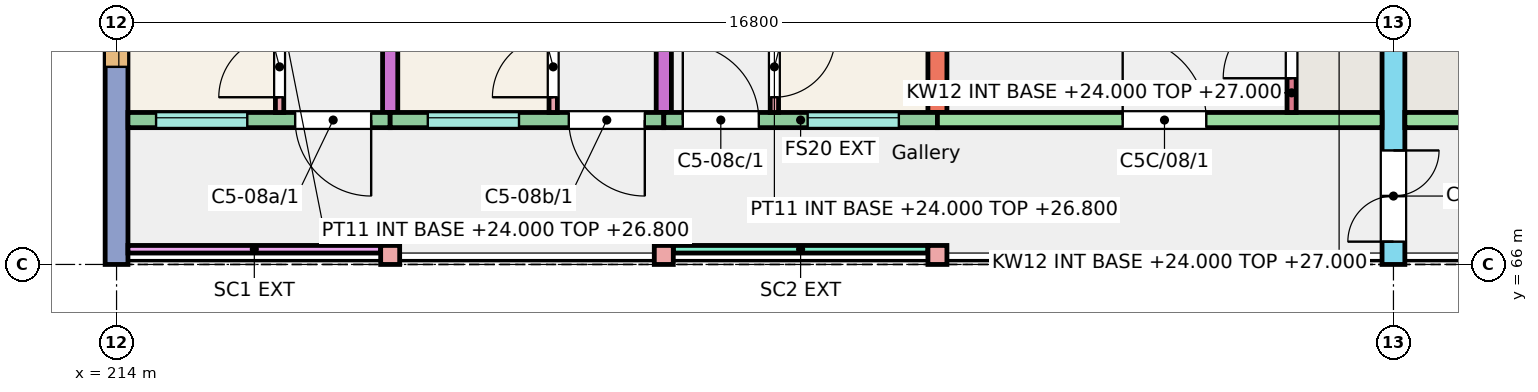
"""IFC4 building model, lengths in metres.
Left out: names, types, materials, properties, quantities, classifications, styles, units other than length and angle.
Written with IfcOpenShell. Run it as: python <this file> out.ifc"""

import sys

from ifc_helpers import new_model, si_unit, direction, frame, frame_2d, origin, origin_2d, place, context, subcontext, project, spatial, rectangle, extrude, element, fill, save


model = new_model("IFC4")
c1 = context("Model", 3, precision=1e-05, world=origin(), true_north=direction((0.0, 1.0)))
c2 = subcontext(c1, "Body", "Model", "MODEL_VIEW")
j1 = project(units=[si_unit("LENGTHUNIT", "METRE"), si_unit("PLANEANGLEUNIT", "RADIAN")], contexts=[c1])
p1 = place(None, origin())
s1 = spatial("IfcSite", under=j1, at=p1, CompositionType="ELEMENT")
p2 = place(p1, origin())
s2 = spatial("IfcBuilding", under=s1, at=p2, CompositionType="ELEMENT")
p3 = place(p2, frame((0.0, 0.0, 24.0)))
s3 = spatial("IfcBuildingStorey", under=s2, at=p3, CompositionType="ELEMENT", Elevation=24.0)
p4 = place(p3, frame((214.0, 66.0, 0.0), z_axis=(0.0, 0.0, 1.0), x_axis=(0.0, 1.0, 0.0)))
e1 = element("IfcWall", 1, at=p4, inside=s3, PredefinedType="SHEAR", context=c2, shape_type="SweptSolid", body=[
    extrude(rectangle(XDim=11.0, YDim=0.3, at=frame_2d((5.5, 0.0))), origin(), (0.0, 0.0, 1.0), 3.0),
])
p5 = place(p4, frame((2.6, 0.0, 0.9)))
e2 = element("IfcOpeningElement", 2, at=p5, cuts=e1, PredefinedType="OPENING", context=c2, shape_type="SweptSolid", body=[
    extrude(rectangle(XDim=1.2, YDim=1.5, at=frame_2d((0.6, 0.75))), frame((0.0, 0.16, 0.0), z_axis=(0.0, -1.0, 0.0), x_axis=(1.0, 0.0, 0.0)), (0.0, 0.0, 1.0), 0.32),
])
p6 = place(p4, frame((8.005, 0.0, 0.9)))
e3 = element("IfcOpeningElement", 3, at=p6, cuts=e1, PredefinedType="OPENING", context=c2, shape_type="SweptSolid", body=[
    extrude(rectangle(XDim=1.8, YDim=1.5, at=frame_2d((0.9, 0.75))), frame((0.0, 0.16, 0.0), z_axis=(0.0, -1.0, 0.0), x_axis=(1.0, 0.0, 0.0)), (0.0, 0.0, 1.0), 0.32),
])
for number, where, z_axis, x_axis in (
    (4, (217.6, 68.0, 0.0), (0.0, 0.0, 1.0), (0.0, 1.0, 0.0)),
    (5, (221.2, 68.0, 0.0), (0.0, 0.0, 1.0), (0.0, 1.0, 0.0)),
):
    element("IfcWall", number, at=place(p3, frame(where, z_axis=z_axis, x_axis=x_axis)), inside=s3, PredefinedType="SHEAR", context=c2, shape_type="SweptSolid", body=[
        extrude(rectangle(XDim=9.0, YDim=0.2, at=frame_2d((4.5, 0.0))), origin(), (0.0, 0.0, 1.0), 3.0),
    ])
p7 = place(p3, frame((224.8, 68.0, 0.0), z_axis=(0.0, 0.0, 1.0), x_axis=(0.0, 1.0, 0.0)))
e6 = element("IfcWall", 6, at=p7, inside=s3, PredefinedType="SHEAR", context=c2, shape_type="SweptSolid", body=[
    extrude(rectangle(XDim=9.0, YDim=0.25, at=frame_2d((4.5, 0.0))), origin(), (0.0, 0.0, 1.0), 3.0),
])
p8 = place(p3, frame((230.8, 66.0, 0.0), z_axis=(0.0, 0.0, 1.0), x_axis=(0.0, 1.0, 0.0)))
e7 = element("IfcWall", 7, at=p8, inside=s3, PredefinedType="SHEAR", context=c2, shape_type="SweptSolid", body=[
    extrude(rectangle(XDim=11.0, YDim=0.3, at=frame_2d((5.5, 0.0))), origin(), (0.0, 0.0, 1.0), 3.0),
])
p9 = place(p8, frame((0.3, 0.0, 0.0)))
e8 = element("IfcOpeningElement", 8, at=p9, cuts=e7, PredefinedType="OPENING", context=c2, shape_type="SweptSolid", body=[
    extrude(rectangle(XDim=1.2, YDim=2.1, at=frame_2d((0.6, 1.05))), frame((0.0, 0.16, 0.0), z_axis=(0.0, -1.0, 0.0), x_axis=(1.0, 0.0, 0.0)), (0.0, 0.0, 1.0), 0.32),
])
p10 = place(p3, frame((214.15, 67.9, 0.0), z_axis=(0.0, 0.0, 1.0), x_axis=(1.0, 0.0, 0.0)))
e9 = element("IfcWall", 9, at=p10, inside=s3, PredefinedType="SOLIDWALL", context=c2, shape_type="SweptSolid", body=[
    extrude(rectangle(XDim=3.45, YDim=0.2, at=frame_2d((1.725, 0.0))), origin(), (0.0, 0.0, 1.0), 3.0),
])
p11 = place(p10, frame((0.37, 0.0, 1.1)))
e10 = element("IfcOpeningElement", 10, at=p11, cuts=e9, PredefinedType="OPENING", context=c2, shape_type="SweptSolid", body=[
    extrude(rectangle(XDim=1.2, YDim=1.3, at=frame_2d((0.6, 0.65))), frame((0.0, 0.11, 0.0), z_axis=(0.0, -1.0, 0.0), x_axis=(1.0, 0.0, 0.0)), (0.0, 0.0, 1.0), 0.22),
])
p12 = place(p10, frame((2.2, 0.0, 0.0)))
e11 = element("IfcOpeningElement", 11, at=p12, cuts=e9, PredefinedType="OPENING", context=c2, shape_type="SweptSolid", body=[
    extrude(rectangle(XDim=1.0, YDim=2.1, at=frame_2d((0.5, 1.05))), frame((0.0, 0.11, 0.0), z_axis=(0.0, -1.0, 0.0), x_axis=(1.0, 0.0, 0.0)), (0.0, 0.0, 1.0), 0.22),
])
p13 = place(p3, frame((217.6, 67.9, 0.0), z_axis=(0.0, 0.0, 1.0), x_axis=(1.0, 0.0, 0.0)))
e12 = element("IfcWall", 12, at=p13, inside=s3, PredefinedType="SOLIDWALL", context=c2, shape_type="SweptSolid", body=[
    extrude(rectangle(XDim=3.6, YDim=0.2, at=frame_2d((1.8, 0.0))), origin(), (0.0, 0.0, 1.0), 3.0),
])
p14 = place(p13, frame((0.495, 0.0, 1.1)))
e13 = element("IfcOpeningElement", 13, at=p14, cuts=e12, PredefinedType="OPENING", context=c2, shape_type="SweptSolid", body=[
    extrude(rectangle(XDim=1.2, YDim=1.3, at=frame_2d((0.6, 0.65))), frame((0.0, 0.11, 0.0), z_axis=(0.0, -1.0, 0.0), x_axis=(1.0, 0.0, 0.0)), (0.0, 0.0, 1.0), 0.22),
])
p15 = place(p13, frame((2.35, 0.0, 0.0)))
e14 = element("IfcOpeningElement", 14, at=p15, cuts=e12, PredefinedType="OPENING", context=c2, shape_type="SweptSolid", body=[
    extrude(rectangle(XDim=1.0, YDim=2.1, at=frame_2d((0.5, 1.05))), frame((0.0, 0.11, 0.0), z_axis=(0.0, -1.0, 0.0), x_axis=(1.0, 0.0, 0.0)), (0.0, 0.0, 1.0), 0.22),
])
p16 = place(p3, frame((221.2, 67.9, 0.0), z_axis=(0.0, 0.0, 1.0), x_axis=(1.0, 0.0, 0.0)))
e15 = element("IfcWall", 15, at=p16, inside=s3, PredefinedType="SOLIDWALL", context=c2, shape_type="SweptSolid", body=[
    extrude(rectangle(XDim=3.6, YDim=0.2, at=frame_2d((1.8, 0.0))), origin(), (0.0, 0.0, 1.0), 3.0),
])
p17 = place(p16, frame((1.893, 0.0, 1.1)))
e16 = element("IfcOpeningElement", 16, at=p17, cuts=e15, PredefinedType="OPENING", context=c2, shape_type="SweptSolid", body=[
    extrude(rectangle(XDim=1.2, YDim=1.3, at=frame_2d((0.6, 0.65))), frame((0.0, 0.11, 0.0), z_axis=(0.0, -1.0, 0.0), x_axis=(1.0, 0.0, 0.0)), (0.0, 0.0, 1.0), 0.22),
])
p18 = place(p16, frame((0.25, 0.0, 0.0)))
e17 = element("IfcOpeningElement", 17, at=p18, cuts=e15, PredefinedType="OPENING", context=c2, shape_type="SweptSolid", body=[
    extrude(rectangle(XDim=1.0, YDim=2.1, at=frame_2d((0.5, 1.05))), frame((0.0, 0.11, 0.0), z_axis=(0.0, -1.0, 0.0), x_axis=(1.0, 0.0, 0.0)), (0.0, 0.0, 1.0), 0.22),
])
p19 = place(p3, frame((224.8, 67.9, 0.0), z_axis=(0.0, 0.0, 1.0), x_axis=(1.0, 0.0, 0.0)))
e18 = element("IfcWall", 18, at=p19, inside=s3, PredefinedType="SHEAR", context=c2, shape_type="SweptSolid", body=[
    extrude(rectangle(XDim=5.85, YDim=0.2, at=frame_2d((2.925, 0.0))), origin(), (0.0, 0.0, 1.0), 3.0),
])
p20 = place(p19, frame((2.438, 0.0, 0.0)))
e19 = element("IfcOpeningElement", 19, at=p20, cuts=e18, PredefinedType="OPENING", context=c2, shape_type="SweptSolid", body=[
    extrude(rectangle(XDim=1.1, YDim=2.1, at=frame_2d((0.55, 1.05))), frame((0.0, 0.11, 0.0), z_axis=(0.0, -1.0, 0.0), x_axis=(1.0, 0.0, 0.0)), (0.0, 0.0, 1.0), 0.22),
])
p21 = place(p3, frame((229.46, 68.0, 0.0), z_axis=(0.0, 0.0, 1.0), x_axis=(0.0, 1.0, 0.0)))
e20 = element("IfcWall", 20, at=p21, inside=s3, PredefinedType="SHEAR", context=c2, shape_type="SweptSolid", body=[
    extrude(rectangle(XDim=1.72, YDim=0.12, at=frame_2d((0.86, 0.0))), origin(), (0.0, 0.0, 1.0), 3.0),
])
p22 = place(p21, frame((0.45, 0.0, 0.0)))
e21 = element("IfcOpeningElement", 21, at=p22, cuts=e20, PredefinedType="OPENING", context=c2, shape_type="SweptSolid", body=[
    extrude(rectangle(XDim=0.9, YDim=2.1, at=frame_2d((0.45, 1.05))), frame((0.0, 0.07, 0.0), z_axis=(0.0, -1.0, 0.0), x_axis=(1.0, 0.0, 0.0)), (0.0, 0.0, 1.0), 0.14),
])
p23 = place(p3, frame((230.95, 67.9, 0.0), z_axis=(0.0, 0.0, 1.0), x_axis=(1.0, 0.0, 0.0)))
e22 = element("IfcWall", 22, at=p23, inside=s3, PredefinedType="SHEAR", context=c2, shape_type="SweptSolid", body=[
    extrude(rectangle(XDim=5.85, YDim=0.2, at=frame_2d((2.925, 0.0))), origin(), (0.0, 0.0, 1.0), 3.0),
])
p24 = place(p23, frame((2.312, 0.0, 0.0)))
e23 = element("IfcOpeningElement", 23, at=p24, cuts=e22, PredefinedType="OPENING", context=c2, shape_type="SweptSolid", body=[
    extrude(rectangle(XDim=1.1, YDim=2.1, at=frame_2d((0.55, 1.05))), frame((0.0, 0.11, 0.0), z_axis=(0.0, -1.0, 0.0), x_axis=(1.0, 0.0, 0.0)), (0.0, 0.0, 1.0), 0.22),
])
for number, where, z_axis, x_axis in (
    (24, (217.6, 66.125, 0.0), (0.0, 0.0, 1.0), (1.0, 0.0, 0.0)),
    (25, (221.2, 66.125, 0.0), (0.0, 0.0, 1.0), (1.0, 0.0, 0.0)),
    (26, (224.8, 66.125, 0.0), (0.0, 0.0, 1.0), (1.0, 0.0, 0.0)),
):
    element("IfcColumn", number, at=place(p3, frame(where, z_axis=z_axis, x_axis=x_axis)), inside=s3, PredefinedType="COLUMN", context=c2, shape_type="SweptSolid", body=[
        extrude(rectangle(XDim=0.25, YDim=0.25, at=origin_2d()), origin(), (0.0, 0.0, 1.0), 3.0),
    ])
p25 = place(p3, frame((214.15, 66.2, 0.0), z_axis=(0.0, 0.0, 1.0), x_axis=(1.0, 0.0, 0.0)))
e27 = element("IfcWall", 27, at=p25, inside=s3, PredefinedType="SOLIDWALL", context=c2, shape_type="SweptSolid", body=[
    extrude(rectangle(XDim=3.325, YDim=0.1, at=frame_2d((1.663, 0.0))), origin(), (0.0, 0.0, 1.0), 2.45),
])
p26 = place(p3, frame((221.325, 66.2, 0.0), z_axis=(0.0, 0.0, 1.0), x_axis=(1.0, 0.0, 0.0)))
e28 = element("IfcWall", 28, at=p26, inside=s3, PredefinedType="SOLIDWALL", context=c2, shape_type="SweptSolid", body=[
    extrude(rectangle(XDim=3.35, YDim=0.1, at=frame_2d((1.675, 0.0))), origin(), (0.0, 0.0, 1.0), 2.45),
])
p27 = place(p3, frame((216.145, 68.0, 0.0), z_axis=(0.0, 0.0, 1.0), x_axis=(0.0, 1.0, 0.0)))
e29 = element("IfcWall", 29, at=p27, inside=s3, PredefinedType="PARTITIONING", context=c2, shape_type="SweptSolid", body=[
    extrude(rectangle(XDim=4.7, YDim=0.11, at=frame_2d((2.35, 0.0))), origin(), (0.0, 0.0, 1.0), 2.8),
])
p28 = place(p27, frame((0.2, 0.0, 0.0)))
e30 = element("IfcOpeningElement", 30, at=p28, cuts=e29, PredefinedType="OPENING", context=c2, shape_type="SweptSolid", body=[
    extrude(rectangle(XDim=0.8, YDim=2.1, at=frame_2d((0.4, 1.05))), frame((0.0, 0.065, 0.0), z_axis=(0.0, -1.0, 0.0), x_axis=(1.0, 0.0, 0.0)), (0.0, 0.0, 1.0), 0.13),
])
p29 = place(p27, frame((3.75, 0.0, 0.0)))
e31 = element("IfcOpeningElement", 31, at=p29, cuts=e29, PredefinedType="OPENING", context=c2, shape_type="SweptSolid", body=[
    extrude(rectangle(XDim=0.8, YDim=2.1, at=frame_2d((0.4, 1.05))), frame((0.0, 0.065, 0.0), z_axis=(0.0, -1.0, 0.0), x_axis=(1.0, 0.0, 0.0)), (0.0, 0.0, 1.0), 0.13),
])
p30 = place(p3, frame((219.745, 68.0, 0.0), z_axis=(0.0, 0.0, 1.0), x_axis=(0.0, 1.0, 0.0)))
e32 = element("IfcWall", 32, at=p30, inside=s3, PredefinedType="PARTITIONING", context=c2, shape_type="SweptSolid", body=[
    extrude(rectangle(XDim=4.3, YDim=0.11, at=frame_2d((2.15, 0.0))), origin(), (0.0, 0.0, 1.0), 2.8),
])
p31 = place(p30, frame((0.2, 0.0, 0.0)))
e33 = element("IfcOpeningElement", 33, at=p31, cuts=e32, PredefinedType="OPENING", context=c2, shape_type="SweptSolid", body=[
    extrude(rectangle(XDim=0.8, YDim=2.1, at=frame_2d((0.4, 1.05))), frame((0.0, 0.065, 0.0), z_axis=(0.0, -1.0, 0.0), x_axis=(1.0, 0.0, 0.0)), (0.0, 0.0, 1.0), 0.13),
])
p32 = place(p30, frame((3.35, 0.0, 0.0)))
e34 = element("IfcOpeningElement", 34, at=p32, cuts=e32, PredefinedType="OPENING", context=c2, shape_type="SweptSolid", body=[
    extrude(rectangle(XDim=0.8, YDim=2.1, at=frame_2d((0.4, 1.05))), frame((0.0, 0.065, 0.0), z_axis=(0.0, -1.0, 0.0), x_axis=(1.0, 0.0, 0.0)), (0.0, 0.0, 1.0), 0.13),
])
p33 = place(p3, frame((222.655, 68.0, 0.0), z_axis=(0.0, 0.0, 1.0), x_axis=(0.0, 1.0, 0.0)))
e35 = element("IfcWall", 35, at=p33, inside=s3, PredefinedType="PARTITIONING", context=c2, shape_type="SweptSolid", body=[
    extrude(rectangle(XDim=4.7, YDim=0.11, at=frame_2d((2.35, 0.0))), origin(), (0.0, 0.0, 1.0), 2.8),
])
p34 = place(p33, frame((0.2, 0.0, 0.0)))
e36 = element("IfcOpeningElement", 36, at=p34, cuts=e35, PredefinedType="OPENING", context=c2, shape_type="SweptSolid", body=[
    extrude(rectangle(XDim=0.8, YDim=2.1, at=frame_2d((0.4, 1.05))), frame((0.0, 0.065, 0.0), z_axis=(0.0, -1.0, 0.0), x_axis=(1.0, 0.0, 0.0)), (0.0, 0.0, 1.0), 0.13),
])
p35 = place(p33, frame((3.75, 0.0, 0.0)))
e37 = element("IfcOpeningElement", 37, at=p35, cuts=e35, PredefinedType="OPENING", context=c2, shape_type="SweptSolid", body=[
    extrude(rectangle(XDim=0.8, YDim=2.1, at=frame_2d((0.4, 1.05))), frame((0.0, 0.065, 0.0), z_axis=(0.0, -1.0, 0.0), x_axis=(1.0, 0.0, 0.0)), (0.0, 0.0, 1.0), 0.13),
])
p36 = place(p11, origin())
e38 = element("IfcWindow", 38, at=p36, inside=s3, PartitioningType="SINGLE_PANEL", PredefinedType="WINDOW", context=c2, shape_type="SweptSolid", body=[
    extrude(rectangle(XDim=1.2, YDim=1.3, at=frame_2d((0.6, 0.65))), frame((0.0, 0.06, 0.0), z_axis=(0.0, -1.0, 0.0), x_axis=(1.0, 0.0, 0.0)), (0.0, 0.0, 1.0), 0.06),
])
fill(e10, e38)
p37 = place(p5, origin())
e39 = element("IfcWindow", 39, at=p37, inside=s3, PartitioningType="SINGLE_PANEL", PredefinedType="WINDOW", context=c2, shape_type="SweptSolid", body=[
    extrude(rectangle(XDim=1.2, YDim=1.5, at=frame_2d((0.6, 0.75))), frame((0.0, 0.0, 0.0), z_axis=(0.0, -1.0, 0.0), x_axis=(1.0, 0.0, 0.0)), (0.0, 0.0, 1.0), 0.06),
])
fill(e2, e39)
p38 = place(p14, origin())
e40 = element("IfcWindow", 40, at=p38, inside=s3, PartitioningType="SINGLE_PANEL", PredefinedType="WINDOW", context=c2, shape_type="SweptSolid", body=[
    extrude(rectangle(XDim=1.2, YDim=1.3, at=frame_2d((0.6, 0.65))), frame((0.0, 0.06, 0.0), z_axis=(0.0, -1.0, 0.0), x_axis=(1.0, 0.0, 0.0)), (0.0, 0.0, 1.0), 0.06),
])
fill(e13, e40)
p39 = place(p17, origin())
e41 = element("IfcWindow", 41, at=p39, inside=s3, PartitioningType="SINGLE_PANEL", PredefinedType="WINDOW", context=c2, shape_type="SweptSolid", body=[
    extrude(rectangle(XDim=1.2, YDim=1.3, at=frame_2d((0.6, 0.65))), frame((0.0, 0.06, 0.0), z_axis=(0.0, -1.0, 0.0), x_axis=(1.0, 0.0, 0.0)), (0.0, 0.0, 1.0), 0.06),
])
fill(e16, e41)
p40 = place(p12, origin())
e42 = element("IfcDoor", 42, at=p40, inside=s3, OperationType="SINGLE_SWING_RIGHT", PredefinedType="DOOR", context=c2, shape_type="SweptSolid", body=[
    extrude(rectangle(XDim=1.0, YDim=2.1, at=frame_2d((0.5, 1.05))), frame((0.0, 0.025, 0.0), z_axis=(0.0, -1.0, 0.0), x_axis=(1.0, 0.0, 0.0)), (0.0, 0.0, 1.0), 0.05),
])
fill(e11, e42)
p41 = place(p28, origin())
e43 = element("IfcDoor", 43, at=p41, inside=s3, OperationType="SINGLE_SWING_LEFT", PredefinedType="DOOR", context=c2, shape_type="SweptSolid", body=[
    extrude(rectangle(XDim=0.8, YDim=2.1, at=frame_2d((0.4, 1.05))), frame((0.0, 0.025, 0.0), z_axis=(0.0, -1.0, 0.0), x_axis=(1.0, 0.0, 0.0)), (0.0, 0.0, 1.0), 0.05),
])
fill(e30, e43)
p42 = place(p15, origin())
e44 = element("IfcDoor", 44, at=p42, inside=s3, OperationType="SINGLE_SWING_RIGHT", PredefinedType="DOOR", context=c2, shape_type="SweptSolid", body=[
    extrude(rectangle(XDim=1.0, YDim=2.1, at=frame_2d((0.5, 1.05))), frame((0.0, 0.025, 0.0), z_axis=(0.0, -1.0, 0.0), x_axis=(1.0, 0.0, 0.0)), (0.0, 0.0, 1.0), 0.05),
])
fill(e14, e44)
p43 = place(p31, origin())
e45 = element("IfcDoor", 45, at=p43, inside=s3, OperationType="SINGLE_SWING_LEFT", PredefinedType="DOOR", context=c2, shape_type="SweptSolid", body=[
    extrude(rectangle(XDim=0.8, YDim=2.1, at=frame_2d((0.4, 1.05))), frame((0.0, 0.025, 0.0), z_axis=(0.0, -1.0, 0.0), x_axis=(1.0, 0.0, 0.0)), (0.0, 0.0, 1.0), 0.05),
])
fill(e33, e45)
p44 = place(p18, origin())
e46 = element("IfcDoor", 46, at=p44, inside=s3, OperationType="SINGLE_SWING_LEFT", PredefinedType="DOOR", context=c2, shape_type="SweptSolid", body=[
    extrude(rectangle(XDim=1.0, YDim=2.1, at=frame_2d((0.5, 1.05))), frame((0.0, 0.025, 0.0), z_axis=(0.0, -1.0, 0.0), x_axis=(1.0, 0.0, 0.0)), (0.0, 0.0, 1.0), 0.05),
])
fill(e17, e46)
p45 = place(p34, origin())
e47 = element("IfcDoor", 47, at=p45, inside=s3, OperationType="SINGLE_SWING_RIGHT", PredefinedType="DOOR", context=c2, shape_type="SweptSolid", body=[
    extrude(rectangle(XDim=0.8, YDim=2.1, at=frame_2d((0.4, 1.05))), frame((0.0, 0.025, 0.0), z_axis=(0.0, -1.0, 0.0), x_axis=(1.0, 0.0, 0.0)), (0.0, 0.0, 1.0), 0.05),
])
fill(e36, e47)
p46 = place(p20, origin())
e48 = element("IfcDoor", 48, at=p46, inside=s3, OperationType="SINGLE_SWING_LEFT", PredefinedType="DOOR", context=c2, shape_type="SweptSolid", body=[
    extrude(rectangle(XDim=1.1, YDim=2.1, at=frame_2d((0.55, 1.05))), frame((0.0, 0.025, 0.0), z_axis=(0.0, -1.0, 0.0), x_axis=(1.0, 0.0, 0.0)), (0.0, 0.0, 1.0), 0.05),
])
fill(e19, e48)
p47 = place(p22, origin())
e49 = element("IfcDoor", 49, at=p47, inside=s3, OperationType="SINGLE_SWING_LEFT", PredefinedType="DOOR", context=c2, shape_type="SweptSolid", body=[
    extrude(rectangle(XDim=0.9, YDim=2.1, at=frame_2d((0.45, 1.05))), frame((0.0, 0.025, 0.0), z_axis=(0.0, -1.0, 0.0), x_axis=(1.0, 0.0, 0.0)), (0.0, 0.0, 1.0), 0.05),
])
fill(e21, e49)
p48 = place(p9, origin())
e50 = element("IfcDoor", 50, at=p48, inside=s3, OperationType="DOUBLE_DOOR_SINGLE_SWING", PredefinedType="DOOR", context=c2, shape_type="SweptSolid", body=[
    extrude(rectangle(XDim=1.2, YDim=2.1, at=frame_2d((0.6, 1.05))), frame((0.0, 0.025, 0.0), z_axis=(0.0, -1.0, 0.0), x_axis=(1.0, 0.0, 0.0)), (0.0, 0.0, 1.0), 0.05),
])
fill(e8, e50)
save(model, sys.argv[1])
